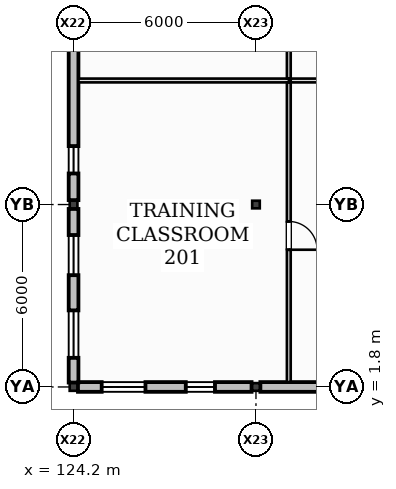
"""IFC4 building model, lengths in metres.
Left out: names, types, materials, properties, quantities, classifications, styles, units other than length and angle.
Written with IfcOpenShell. Run it as: python <this file> out.ifc"""

import sys

from ifc_helpers import new_model, si_unit, direction, frame, frame_2d, origin, origin_2d, place, context, subcontext, project, spatial, rectangle, hollow_rectangle, i_section, extrude, element, fill, save


model = new_model("IFC4")
c1 = context("Model", 3, precision=1e-05, world=origin(), true_north=direction((0.0, 1.0)))
c2 = subcontext(c1, "Body", "Model", "MODEL_VIEW")
j1 = project(units=[si_unit("LENGTHUNIT", "METRE"), si_unit("PLANEANGLEUNIT", "RADIAN")], contexts=[c1])
p1 = place(None, origin())
s1 = spatial("IfcSite", under=j1, at=p1, CompositionType="ELEMENT")
p2 = place(p1, origin())
s2 = spatial("IfcBuilding", under=s1, at=p2, CompositionType="ELEMENT")
p3 = place(p2, frame((0.0, 0.0, 6.0)))
s3 = spatial("IfcBuildingStorey", under=s2, at=p3, CompositionType="ELEMENT", Elevation=6.0)
for number, where, z_axis, x_axis in (
    (1, (124.2, 1.8, 0.0), (0.0, 0.0, 1.0), (1.0, 0.0, 0.0)),
    (2, (124.2, 7.8, 0.0), (0.0, 0.0, 1.0), (1.0, 0.0, 0.0)),
    (3, (130.2, 1.8, 0.0), (0.0, 0.0, 1.0), (1.0, 0.0, 0.0)),
):
    element("IfcColumn", number, at=place(p3, frame(where, z_axis=z_axis, x_axis=x_axis)), inside=s3, PredefinedType="COLUMN", context=c2, shape_type="SweptSolid", body=[
        extrude(i_section(OverallWidth=0.254, OverallDepth=0.253, WebThickness=0.009, FlangeThickness=0.014, at=origin_2d()), origin(), (0.0, 0.0, 1.0), 4.0),
    ])
p4 = place(p3, frame((130.2, 7.8, 0.0), z_axis=(0.0, 0.0, 1.0), x_axis=(1.0, 0.0, 0.0)))
e4 = element("IfcColumn", 4, at=p4, inside=s3, PredefinedType="COLUMN", context=c2, shape_type="SweptSolid", body=[
    extrude(hollow_rectangle(XDim=0.25, YDim=0.25, WallThickness=0.012, at=origin_2d()), origin(), (0.0, 0.0, 1.0), 4.0),
])
p5 = place(p3, frame((124.345, 1.8, 0.0), z_axis=(0.0, 0.0, 1.0), x_axis=(1.0, 0.0, 0.0)))
e5 = element("IfcWall", 5, at=p5, inside=s3, PredefinedType="STANDARD", context=c2, shape_type="SweptSolid", body=[
    extrude(rectangle(XDim=5.71, YDim=0.32, at=frame_2d((2.855, 0.0))), origin(), (0.0, 0.0, 1.0), 3.223),
])
p6 = place(p5, frame((0.78, 0.0, 1.18)))
e6 = element("IfcOpeningElement", 6, at=p6, cuts=e5, PredefinedType="OPENING", context=c2, shape_type="SweptSolid", body=[
    extrude(rectangle(XDim=1.44, YDim=1.44, at=frame_2d((0.72, 0.72))), frame((0.0, 0.17, 0.0), z_axis=(0.0, -1.0, 0.0), x_axis=(1.0, 0.0, 0.0)), (0.0, 0.0, 1.0), 0.34),
])
p7 = place(p5, frame((3.546, 0.0, 0.96)))
e7 = element("IfcOpeningElement", 7, at=p7, cuts=e5, PredefinedType="OPENING", context=c2, shape_type="SweptSolid", body=[
    extrude(rectangle(XDim=0.96, YDim=0.96, at=frame_2d((0.48, 0.48))), frame((0.0, 0.17, 0.0), z_axis=(0.0, -1.0, 0.0), x_axis=(1.0, 0.0, 0.0)), (0.0, 0.0, 1.0), 0.34),
])
p8 = place(p3, frame((130.345, 1.8, 0.0), z_axis=(0.0, 0.0, 1.0), x_axis=(1.0, 0.0, 0.0)))
e8 = element("IfcWall", 8, at=p8, inside=s3, PredefinedType="STANDARD", context=c2, shape_type="SweptSolid", body=[
    extrude(rectangle(XDim=5.71, YDim=0.32, at=frame_2d((2.855, 0.0))), origin(), (0.0, 0.0, 1.0), 3.223),
])
p9 = place(p8, frame((3.855, 0.0, 1.28)))
e9 = element("IfcOpeningElement", 9, at=p9, cuts=e8, PredefinedType="OPENING", context=c2, shape_type="SweptSolid", body=[
    extrude(rectangle(XDim=1.02, YDim=1.02, at=frame_2d((0.51, 0.51))), frame((0.0, 0.17, 0.0), z_axis=(0.0, -1.0, 0.0), x_axis=(1.0, 0.0, 0.0)), (0.0, 0.0, 1.0), 0.34),
])
p10 = place(p3, frame((124.2, 7.655, 0.0), z_axis=(0.0, 0.0, 1.0), x_axis=(0.0, -1.0, 0.0)))
e10 = element("IfcWall", 10, at=p10, inside=s3, PredefinedType="STANDARD", context=c2, shape_type="SweptSolid", body=[
    extrude(rectangle(XDim=5.71, YDim=0.32, at=frame_2d((2.855, 0.0))), origin(), (0.0, 0.0, 1.0), 3.227),
])
p11 = place(p10, frame((0.858, 0.0, 1.18)))
e11 = element("IfcOpeningElement", 11, at=p11, cuts=e10, PredefinedType="OPENING", context=c2, shape_type="SweptSolid", body=[
    extrude(rectangle(XDim=1.32, YDim=1.32, at=frame_2d((0.66, 0.66))), frame((0.0, 0.17, 0.0), z_axis=(0.0, -1.0, 0.0), x_axis=(1.0, 0.0, 0.0)), (0.0, 0.0, 1.0), 0.34),
])
p12 = place(p10, frame((3.336, 0.0, 0.96)))
e12 = element("IfcOpeningElement", 12, at=p12, cuts=e10, PredefinedType="OPENING", context=c2, shape_type="SweptSolid", body=[
    extrude(rectangle(XDim=1.56, YDim=1.56, at=frame_2d((0.78, 0.78))), frame((0.0, 0.17, 0.0), z_axis=(0.0, -1.0, 0.0), x_axis=(1.0, 0.0, 0.0)), (0.0, 0.0, 1.0), 0.34),
])
p13 = place(p3, frame((124.2, 13.655, 0.0), z_axis=(0.0, 0.0, 1.0), x_axis=(0.0, -1.0, 0.0)))
e13 = element("IfcWall", 13, at=p13, inside=s3, PredefinedType="STANDARD", context=c2, shape_type="SweptSolid", body=[
    extrude(rectangle(XDim=5.71, YDim=0.32, at=frame_2d((2.855, 0.0))), origin(), (0.0, 0.0, 1.0), 3.227),
])
p14 = place(p13, frame((3.933, 0.0, 1.28)))
e14 = element("IfcOpeningElement", 14, at=p14, cuts=e13, PredefinedType="OPENING", context=c2, shape_type="SweptSolid", body=[
    extrude(rectangle(XDim=0.9, YDim=0.9, at=frame_2d((0.45, 0.45))), frame((0.0, 0.17, 0.0), z_axis=(0.0, -1.0, 0.0), x_axis=(1.0, 0.0, 0.0)), (0.0, 0.0, 1.0), 0.34),
])
p15 = place(p3, frame((124.36, 11.88, 0.0), z_axis=(0.0, 0.0, 1.0), x_axis=(1.0, 0.0, 0.0)))
e15 = element("IfcWall", 15, at=p15, inside=s3, PredefinedType="PARTITIONING", context=c2, shape_type="SweptSolid", body=[
    extrude(rectangle(XDim=6.922, YDim=0.125, at=frame_2d((3.461, 0.0))), origin(), (0.0, 0.0, 1.0), 3.72),
])
p16 = place(p3, frame((131.28, 11.817, 0.0), z_axis=(0.0, 0.0, 1.0), x_axis=(0.0, -1.0, 0.0)))
e16 = element("IfcWall", 16, at=p16, inside=s3, PredefinedType="PARTITIONING", context=c2, shape_type="SweptSolid", body=[
    extrude(rectangle(XDim=9.857, YDim=0.125, at=frame_2d((4.929, 0.0))), origin(), (0.0, 0.0, 1.0), 3.72),
])
p17 = place(p16, frame((4.574, 0.0, 0.0)))
e17 = element("IfcOpeningElement", 17, at=p17, cuts=e16, PredefinedType="OPENING", context=c2, shape_type="SweptSolid", body=[
    extrude(rectangle(XDim=0.93, YDim=2.1, at=frame_2d((0.465, 1.05))), frame((0.0, 0.073, 0.0), z_axis=(0.0, -1.0, 0.0), x_axis=(1.0, 0.0, 0.0)), (0.0, 0.0, 1.0), 0.145),
])
p18 = place(p3, frame((131.343, 11.88, 0.0), z_axis=(0.0, 0.0, 1.0), x_axis=(1.0, 0.0, 0.0)))
e18 = element("IfcWall", 18, at=p18, inside=s3, PredefinedType="PARTITIONING", context=c2, shape_type="SweptSolid", body=[
    extrude(rectangle(XDim=6.82, YDim=0.125, at=frame_2d((3.41, 0.0))), origin(), (0.0, 0.0, 1.0), 3.72),
])
p19 = place(p3, frame((131.28, 24.097, 0.0), z_axis=(0.0, 0.0, 1.0), x_axis=(0.0, -1.0, 0.0)))
e19 = element("IfcWall", 19, at=p19, inside=s3, PredefinedType="PARTITIONING", context=c2, shape_type="SweptSolid", body=[
    extrude(rectangle(XDim=12.155, YDim=0.125, at=frame_2d((6.078, 0.0))), origin(), (0.0, 0.0, 1.0), 3.72),
])
p20 = place(p6, origin())
e20 = element("IfcWindow", 20, at=p20, inside=s3, PartitioningType="SINGLE_PANEL", PredefinedType="WINDOW", context=c2, shape_type="SweptSolid", body=[
    extrude(rectangle(XDim=1.44, YDim=1.44, at=frame_2d((0.72, 0.72))), frame((0.0, 0.03, 0.0), z_axis=(0.0, -1.0, 0.0), x_axis=(1.0, 0.0, 0.0)), (0.0, 0.0, 1.0), 0.06),
])
fill(e6, e20)
p21 = place(p7, origin())
e21 = element("IfcWindow", 21, at=p21, inside=s3, PartitioningType="SINGLE_PANEL", PredefinedType="WINDOW", context=c2, shape_type="SweptSolid", body=[
    extrude(rectangle(XDim=0.96, YDim=0.96, at=frame_2d((0.48, 0.48))), frame((0.0, 0.03, 0.0), z_axis=(0.0, -1.0, 0.0), x_axis=(1.0, 0.0, 0.0)), (0.0, 0.0, 1.0), 0.06),
])
fill(e7, e21)
p22 = place(p11, origin())
e22 = element("IfcWindow", 22, at=p22, inside=s3, PartitioningType="SINGLE_PANEL", PredefinedType="WINDOW", context=c2, shape_type="SweptSolid", body=[
    extrude(rectangle(XDim=1.32, YDim=1.32, at=frame_2d((0.66, 0.66))), frame((0.0, 0.03, 0.0), z_axis=(0.0, -1.0, 0.0), x_axis=(1.0, 0.0, 0.0)), (0.0, 0.0, 1.0), 0.06),
])
fill(e11, e22)
p23 = place(p12, origin())
e23 = element("IfcWindow", 23, at=p23, inside=s3, PartitioningType="SINGLE_PANEL", PredefinedType="WINDOW", context=c2, shape_type="SweptSolid", body=[
    extrude(rectangle(XDim=1.56, YDim=1.56, at=frame_2d((0.78, 0.78))), frame((0.0, 0.03, 0.0), z_axis=(0.0, -1.0, 0.0), x_axis=(1.0, 0.0, 0.0)), (0.0, 0.0, 1.0), 0.06),
])
fill(e12, e23)
p24 = place(p14, origin())
e24 = element("IfcWindow", 24, at=p24, inside=s3, PartitioningType="SINGLE_PANEL", PredefinedType="WINDOW", context=c2, shape_type="SweptSolid", body=[
    extrude(rectangle(XDim=0.9, YDim=0.9, at=frame_2d((0.45, 0.45))), frame((0.0, 0.03, 0.0), z_axis=(0.0, -1.0, 0.0), x_axis=(1.0, 0.0, 0.0)), (0.0, 0.0, 1.0), 0.06),
])
fill(e14, e24)
p25 = place(p17, frame((0.93, 0.0, 0.0), z_axis=(0.0, 0.0, 1.0), x_axis=(-1.0, 0.0, 0.0)))
e25 = element("IfcDoor", 25, at=p25, inside=s3, OperationType="SINGLE_SWING_RIGHT", PredefinedType="DOOR", context=c2, shape_type="SweptSolid", body=[
    extrude(rectangle(XDim=0.93, YDim=2.1, at=frame_2d((0.465, 1.05))), frame((0.0, 0.025, 0.0), z_axis=(0.0, -1.0, 0.0), x_axis=(1.0, 0.0, 0.0)), (0.0, 0.0, 1.0), 0.05),
])
fill(e17, e25)
save(model, sys.argv[1])
